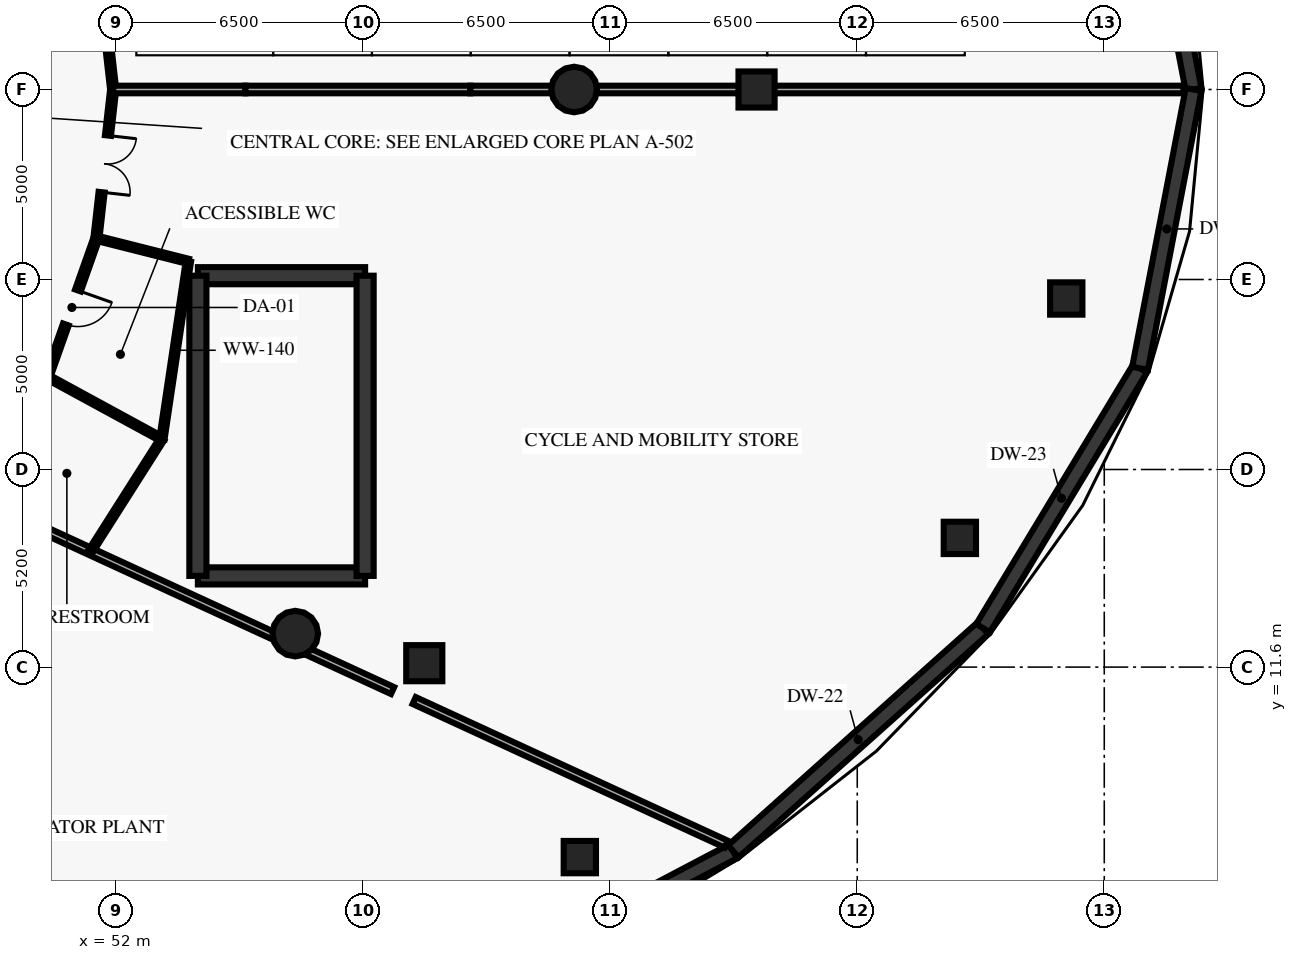
"""IFC4 building model, lengths in metres.
Left out: names, types, materials, properties, quantities, classifications, styles, units other than length and angle.
Written with IfcOpenShell. Run it as: python <this file> out.ifc"""

import sys

from ifc_helpers import new_model, si_unit, direction, frame, frame_2d, origin, origin_2d, place, context, subcontext, project, spatial, rectangle, circle, extrude, element, fill, save


model = new_model("IFC4")
c1 = context("Model", 3, precision=1e-05, world=origin(), true_north=direction((0.0, 1.0)))
c2 = subcontext(c1, "Body", "Model", "MODEL_VIEW")
j1 = project(units=[si_unit("LENGTHUNIT", "METRE"), si_unit("PLANEANGLEUNIT", "RADIAN")], contexts=[c1])
p1 = place(None, origin())
s1 = spatial("IfcSite", under=j1, at=p1, CompositionType="ELEMENT")
p2 = place(p1, origin())
s2 = spatial("IfcBuilding", under=s1, at=p2, CompositionType="ELEMENT")
p3 = place(p2, frame((0.0, 0.0, -4.5)))
s3 = spatial("IfcBuildingStorey", under=s2, at=p3, CompositionType="ELEMENT", Elevation=-4.5)
for number, where, z_axis, x_axis in (
    (1, (64.05, 26.8, 0.0), (0.0, 0.0, 1.0), (1.0, 0.0, 0.0)),
    (2, (56.713, 12.481, 0.0), (0.0, 0.0, 1.0), (1.0, 0.0, 0.0)),
):
    element("IfcColumn", number, at=place(p3, frame(where, z_axis=z_axis, x_axis=x_axis)), inside=s3, PredefinedType="COLUMN", context=c2, shape_type="SweptSolid", body=[
        extrude(circle(Radius=0.6, at=origin_2d()), origin(), (0.0, 0.0, 1.0), 4.18),
    ])
for number, where, z_axis, x_axis in (
    (3, (68.85, 26.8, 0.0), (0.0, 0.0, 1.0), (1.0, 0.0, 0.0)),
    (4, (60.107, 11.703, 0.0), (0.0, 0.0, 1.0), (1.0, 0.0, 0.0)),
):
    element("IfcColumn", number, at=place(p3, frame(where, z_axis=z_axis, x_axis=x_axis)), inside=s3, PredefinedType="COLUMN", context=c2, shape_type="SweptSolid", body=[
        extrude(rectangle(XDim=0.95, YDim=0.95, at=origin_2d()), origin(), (0.0, 0.0, 1.0), 4.18),
    ])
for number, where, z_axis, x_axis in (
    (5, (77.0, 21.3, 0.0), (0.0, 0.0, 1.0), (1.0, 0.0, 0.0)),
    (6, (74.2, 15.0, 0.0), (0.0, 0.0, 1.0), (1.0, 0.0, 0.0)),
    (7, (64.2, 6.6, 0.0), (0.0, 0.0, 1.0), (1.0, 0.0, 0.0)),
):
    element("IfcColumn", number, at=place(p3, frame(where, z_axis=z_axis, x_axis=x_axis)), inside=s3, PredefinedType="COLUMN", context=c2, shape_type="SweptSolid", body=[
        extrude(rectangle(XDim=0.85, YDim=0.85, at=origin_2d()), origin(), (0.0, 0.0, 1.0), 4.18),
    ])
p4 = place(p3, frame((80.35, 26.8, 0.0), z_axis=(0.0, 0.0, 1.0), x_axis=(-0.188595316219, 0.982054889861, 0.0)))
e8 = element("IfcWall", 8, at=p4, inside=s3, PredefinedType="SHEAR", context=c2, shape_type="SweptSolid", body=[
    extrude(rectangle(XDim=7.472, YDim=0.42, at=frame_2d((3.736, 0.0))), origin(), (0.0, 0.0, 1.0), 4.18),
])
p5 = place(p3, frame((59.675, 2.248, 0.0), z_axis=(0.0, 0.0, 1.0), x_axis=(0.884981697028, 0.46562581106, 0.0)))
e9 = element("IfcWall", 9, at=p5, inside=s3, PredefinedType="SHEAR", context=c2, shape_type="SweptSolid", body=[
    extrude(rectangle(XDim=9.677, YDim=0.42, at=frame_2d((4.838, 0.0))), origin(), (0.0, 0.0, 1.0), 4.18),
])
p6 = place(p3, frame((68.239, 6.754, 0.0), z_axis=(0.0, 0.0, 1.0), x_axis=(0.745707061302, 0.666273951707, 0.0)))
e10 = element("IfcWall", 10, at=p6, inside=s3, PredefinedType="SHEAR", context=c2, shape_type="SweptSolid", body=[
    extrude(rectangle(XDim=8.812, YDim=0.42, at=frame_2d((4.406, 0.0))), origin(), (0.0, 0.0, 1.0), 4.18),
])
p7 = place(p3, frame((74.81, 12.625, 0.0), z_axis=(0.0, 0.0, 1.0), x_axis=(0.517136164524, 0.855903141332, 0.0)))
e11 = element("IfcWall", 11, at=p7, inside=s3, PredefinedType="SHEAR", context=c2, shape_type="SweptSolid", body=[
    extrude(rectangle(XDim=7.988, YDim=0.42, at=frame_2d((3.994, 0.0))), origin(), (0.0, 0.0, 1.0), 4.18),
])
p8 = place(p3, frame((78.941, 19.462, 0.0), z_axis=(0.0, 0.0, 1.0), x_axis=(0.188589264795, 0.982056051966, 0.0)))
e12 = element("IfcWall", 12, at=p8, inside=s3, PredefinedType="SHEAR", context=c2, shape_type="SweptSolid", body=[
    extrude(rectangle(XDim=7.472, YDim=0.42, at=frame_2d((3.736, 0.0))), origin(), (0.0, 0.0, 1.0), 4.18),
])
for number, where, z_axis, x_axis in (
    (13, (54.15, 14.0, 0.0), (0.0, 0.0, 1.0), (1.0, 0.0, 0.0)),
    (14, (54.15, 21.9, 0.0), (0.0, 0.0, 1.0), (1.0, 0.0, 0.0)),
):
    element("IfcWall", number, at=place(p3, frame(where, z_axis=z_axis, x_axis=x_axis)), inside=s3, PredefinedType="SHEAR", context=c2, shape_type="SweptSolid", body=[
        extrude(rectangle(XDim=4.4, YDim=0.45, at=frame_2d((2.2, 0.0))), origin(), (0.0, 0.0, 1.0), 4.18),
    ])
for number, where, z_axis, x_axis in (
    (15, (54.15, 14.0, 0.0), (0.0, 0.0, 1.0), (0.0, 1.0, 0.0)),
    (16, (58.55, 14.0, 0.0), (0.0, 0.0, 1.0), (0.0, 1.0, 0.0)),
):
    element("IfcWall", number, at=place(p3, frame(where, z_axis=z_axis, x_axis=x_axis)), inside=s3, PredefinedType="SHEAR", context=c2, shape_type="SweptSolid", body=[
        extrude(rectangle(XDim=7.9, YDim=0.45, at=frame_2d((3.95, 0.0))), origin(), (0.0, 0.0, 1.0), 4.18),
    ])
p9 = place(p3, frame((51.92, 26.8, 0.0), z_axis=(0.0, 0.0, 1.0), x_axis=(-0.111731247657, 0.993738460711, 0.0)))
e17 = element("IfcWall", 17, at=p9, inside=s3, PredefinedType="PARTITIONING", context=c2, shape_type="SweptSolid", body=[
    extrude(rectangle(XDim=3.938, YDim=0.16, at=frame_2d((1.969, 0.0))), origin(), (0.0, 0.0, 1.0), 4.18),
])
p10 = place(p3, frame((51.48, 22.887, 0.0), z_axis=(0.0, 0.0, 1.0), x_axis=(-0.333704620558, -0.942677689467, 0.0)))
e18 = element("IfcWall", 18, at=p10, inside=s3, PredefinedType="PARTITIONING", context=c2, shape_type="SweptSolid", body=[
    extrude(rectangle(XDim=3.869, YDim=0.16, at=frame_2d((1.934, 0.0))), origin(), (0.0, 0.0, 1.0), 4.18),
])
p11 = place(p10, frame((1.459, 0.0, 0.0)))
e19 = element("IfcOpeningElement", 19, at=p11, cuts=e18, PredefinedType="OPENING", context=c2, shape_type="SweptSolid", body=[
    extrude(rectangle(XDim=0.95, YDim=2.1, at=frame_2d((0.475, 1.05))), frame((0.0, 0.09, 0.0), z_axis=(0.0, -1.0, 0.0), x_axis=(1.0, 0.0, 0.0)), (0.0, 0.0, 1.0), 0.18),
])
p12 = place(p3, frame((51.92, 26.8, 0.0), z_axis=(0.0, 0.0, 1.0), x_axis=(-0.111724363671, -0.99373923469, 0.0)))
e20 = element("IfcWall", 20, at=p12, inside=s3, PredefinedType="PARTITIONING", context=c2, shape_type="SweptSolid", body=[
    extrude(rectangle(XDim=3.938, YDim=0.16, at=frame_2d((1.969, 0.0))), origin(), (0.0, 0.0, 1.0), 4.18),
])
p13 = place(p12, frame((1.219, 0.0, 0.0)))
e21 = element("IfcOpeningElement", 21, at=p13, cuts=e20, PredefinedType="OPENING", context=c2, shape_type="SweptSolid", body=[
    extrude(rectangle(XDim=1.5, YDim=2.2, at=frame_2d((0.75, 1.1))), frame((0.0, 0.09, 0.0), z_axis=(0.0, -1.0, 0.0), x_axis=(1.0, 0.0, 0.0)), (0.0, 0.0, 1.0), 0.18),
])
p14 = place(p3, frame((51.92, 26.8, 0.0), z_axis=(0.0, 0.0, 1.0), x_axis=(1.0, 0.0, 0.0)))
e22 = element("IfcWall", 22, at=p14, inside=s3, PredefinedType="SOLIDWALL", context=c2, shape_type="SweptSolid", body=[
    extrude(rectangle(XDim=3.48, YDim=0.2, at=frame_2d((1.74, 0.0))), origin(), (0.0, 0.0, 1.0), 4.18),
])
p15 = place(p3, frame((55.4, 26.8, 0.0), z_axis=(0.0, 0.0, 1.0), x_axis=(1.0, 0.0, 0.0)))
e23 = element("IfcWall", 23, at=p15, inside=s3, PredefinedType="SOLIDWALL", context=c2, shape_type="SweptSolid", body=[
    extrude(rectangle(XDim=5.917, YDim=0.2, at=frame_2d((2.958, 0.0))), origin(), (0.0, 0.0, 1.0), 4.18),
])
p16 = place(p3, frame((61.317, 26.8, 0.0), z_axis=(0.0, 0.0, 1.0), x_axis=(1.0, 0.0, 0.0)))
e24 = element("IfcWall", 24, at=p16, inside=s3, PredefinedType="SOLIDWALL", context=c2, shape_type="SweptSolid", body=[
    extrude(rectangle(XDim=7.533, YDim=0.2, at=frame_2d((3.767, 0.0))), origin(), (0.0, 0.0, 1.0), 3.14),
])
p17 = place(p3, frame((68.85, 26.8, 0.0), z_axis=(0.0, 0.0, 1.0), x_axis=(1.0, 0.0, 0.0)))
e25 = element("IfcWall", 25, at=p17, inside=s3, PredefinedType="SOLIDWALL", context=c2, shape_type="SweptSolid", body=[
    extrude(rectangle(XDim=11.235, YDim=0.2, at=frame_2d((5.617, 0.0))), origin(), (0.0, 0.0, 1.0), 4.18),
])
p18 = place(p3, frame((48.136, 16.109, 0.0), z_axis=(0.0, 0.0, 1.0), x_axis=(0.908368089602, -0.418171512411, 0.0)))
e26 = element("IfcWall", 26, at=p18, inside=s3, PredefinedType="SOLIDWALL", context=c2, shape_type="SweptSolid", body=[
    extrude(rectangle(XDim=12.26, YDim=0.2, at=frame_2d((6.13, 0.0))), origin(), (0.0, 0.0, 1.0), 4.18),
])
p19 = place(p3, frame((59.841, 10.72, 0.0), z_axis=(0.0, 0.0, 1.0), x_axis=(0.90838663627, -0.41813122228, 0.0)))
e27 = element("IfcWall", 27, at=p19, inside=s3, PredefinedType="SOLIDWALL", context=c2, shape_type="SweptSolid", body=[
    extrude(rectangle(XDim=9.038, YDim=0.2, at=frame_2d((4.519, 0.0))), origin(), (0.0, 0.0, 1.0), 4.18),
])
p20 = place(p3, frame((50.189, 19.24, 0.0), z_axis=(0.0, 0.0, 1.0), x_axis=(0.878392721738, -0.477939563541, 0.0)))
e28 = element("IfcWall", 28, at=p20, inside=s3, PredefinedType="PARTITIONING", context=c2, shape_type="SweptSolid", body=[
    extrude(rectangle(XDim=3.431, YDim=0.14, at=frame_2d((1.716, 0.0))), origin(), (0.0, 0.0, 1.0), 4.18),
])
p21 = place(p3, frame((51.48, 22.887, 0.0), z_axis=(0.0, 0.0, 1.0), x_axis=(0.969564374521, -0.244836524357, 0.0)))
e29 = element("IfcWall", 29, at=p21, inside=s3, PredefinedType="PARTITIONING", context=c2, shape_type="SweptSolid", body=[
    extrude(rectangle(XDim=2.496, YDim=0.14, at=frame_2d((1.248, 0.0))), origin(), (0.0, 0.0, 1.0), 4.18),
])
p22 = place(p3, frame((51.322, 14.642, 0.0), z_axis=(0.0, 0.0, 1.0), x_axis=(0.53656900511, 0.84385644677, 0.0)))
e30 = element("IfcWall", 30, at=p22, inside=s3, PredefinedType="PARTITIONING", context=c2, shape_type="SweptSolid", body=[
    extrude(rectangle(XDim=3.505, YDim=0.14, at=frame_2d((1.753, 0.0))), origin(), (0.0, 0.0, 1.0), 4.18),
])
p23 = place(p3, frame((53.203, 17.6, 0.0), z_axis=(0.0, 0.0, 1.0), x_axis=(0.147441370436, 0.989070797407, 0.0)))
e31 = element("IfcWall", 31, at=p23, inside=s3, PredefinedType="PARTITIONING", context=c2, shape_type="SweptSolid", body=[
    extrude(rectangle(XDim=4.728, YDim=0.14, at=frame_2d((2.364, 0.0))), origin(), (0.0, 0.0, 1.0), 4.18),
])
p24 = place(p11, origin())
e32 = element("IfcDoor", 32, at=p24, inside=s3, OperationType="SINGLE_SWING_LEFT", PredefinedType="DOOR", context=c2, shape_type="SweptSolid", body=[
    extrude(rectangle(XDim=0.95, YDim=2.1, at=frame_2d((0.475, 1.05))), frame((0.0, 0.025, 0.0), z_axis=(0.0, -1.0, 0.0), x_axis=(1.0, 0.0, 0.0)), (0.0, 0.0, 1.0), 0.05),
])
fill(e19, e32)
p25 = place(p13, origin())
e33 = element("IfcDoor", 33, at=p25, inside=s3, OperationType="DOUBLE_DOOR_SINGLE_SWING", PredefinedType="DOOR", context=c2, shape_type="SweptSolid", body=[
    extrude(rectangle(XDim=1.5, YDim=2.2, at=frame_2d((0.75, 1.1))), frame((0.0, 0.025, 0.0), z_axis=(0.0, -1.0, 0.0), x_axis=(1.0, 0.0, 0.0)), (0.0, 0.0, 1.0), 0.05),
])
fill(e21, e33)
save(model, sys.argv[1])
